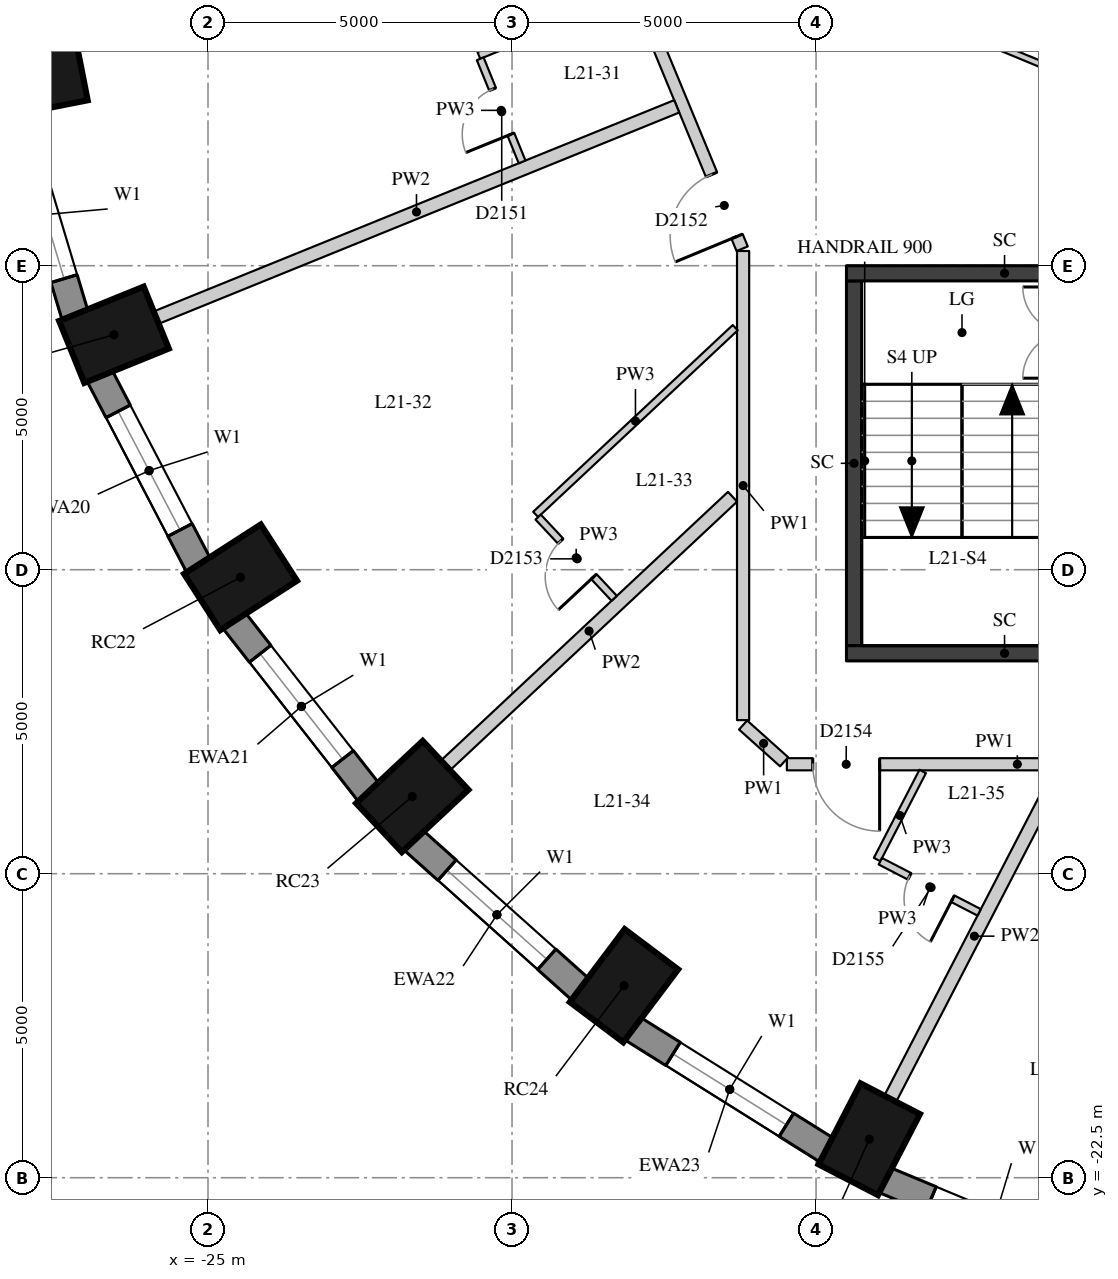
"""IFC4 building model, lengths in metres.
Left out: names, types, materials, properties, quantities, classifications, styles, units other than length and angle.
Written with IfcOpenShell. Run it as: python <this file> out.ifc"""

import sys

from ifc_helpers import new_model, si_unit, direction, frame, frame_2d, origin, origin_2d, place, context, subcontext, project, spatial, rectangle, extrude, element, fill, save


model = new_model("IFC4")
c1 = context("Model", 3, precision=1e-05, world=origin(), true_north=direction((0.0, 1.0)))
c2 = subcontext(c1, "Body", "Model", "MODEL_VIEW")
j1 = project(units=[si_unit("LENGTHUNIT", "METRE"), si_unit("PLANEANGLEUNIT", "RADIAN")], contexts=[c1])
p1 = place(None, origin())
s1 = spatial("IfcSite", under=j1, at=p1, CompositionType="ELEMENT")
p2 = place(p1, origin())
s2 = spatial("IfcBuilding", under=s1, at=p2, CompositionType="ELEMENT")
p3 = place(p2, frame((0.0, 0.0, 77.8)))
s3 = spatial("IfcBuildingStorey", under=s2, at=p3, CompositionType="ELEMENT", Elevation=77.8)
for number, where, z_axis, x_axis in (
    (1, (-27.821, -4.385, 0.0), (0.0, 0.0, 1.0), (-0.981, -0.193, 0.0)),
    (2, (-26.546, -8.636, 0.0), (0.0, 0.0, 1.0), (-0.927, -0.376, 0.0)),
    (3, (-24.465, -12.625, 0.0), (0.0, 0.0, 1.0), (-0.841, -0.541, 0.0)),
    (4, (-21.641, -16.23, 0.0), (0.0, 0.0, 1.0), (-0.73, -0.683, 0.0)),
    (5, (-18.159, -19.343, 0.0), (0.0, 0.0, 1.0), (-0.601, -0.799, 0.0)),
    (6, (-14.125, -21.867, 0.0), (0.0, 0.0, 1.0), (-0.46, -0.888, 0.0)),
):
    element("IfcColumn", number, at=place(p3, frame(where, z_axis=z_axis, x_axis=x_axis)), inside=s3, PredefinedType="COLUMN", context=c2, shape_type="SweptSolid", body=[
        extrude(rectangle(XDim=1.5, YDim=1.1, at=origin_2d()), origin(), (0.0, 0.0, 1.0), 3.3),
    ])
p4 = place(p3, frame((-28.182, -4.996, 0.0), z_axis=(0.0, 0.0, 1.0), x_axis=(0.287064133733, -0.957911364963, 0.0)))
e7 = element("IfcWall", 7, at=p4, inside=s3, PredefinedType="SOLIDWALL", context=c2, shape_type="SweptSolid", body=[
    extrude(rectangle(XDim=3.473, YDim=0.45, at=frame_2d((1.737, 0.0))), origin(), (0.0, 0.0, 1.0), 3.02),
])
p5 = place(p4, frame((0.637, 0.0, 0.4)))
e8 = element("IfcOpeningElement", 8, at=p5, cuts=e7, PredefinedType="OPENING", context=c2, shape_type="SweptSolid", body=[
    extrude(rectangle(XDim=2.2, YDim=1.75, at=frame_2d((1.1, 0.875))), frame((0.0, 0.235, 0.0), z_axis=(0.0, -1.0, 0.0), x_axis=(1.0, 0.0, 0.0)), (0.0, 0.0, 1.0), 0.47),
])
p6 = place(p3, frame((-26.786, -9.305, 0.0), z_axis=(0.0, 0.0, 1.0), x_axis=(0.462492775226, -0.886623050041, 0.0)))
e9 = element("IfcWall", 9, at=p6, inside=s3, PredefinedType="SOLIDWALL", context=c2, shape_type="SweptSolid", body=[
    extrude(rectangle(XDim=3.532, YDim=0.45, at=frame_2d((1.766, 0.0))), origin(), (0.0, 0.0, 1.0), 3.02),
])
p7 = place(p6, frame((0.666, 0.0, 0.4)))
e10 = element("IfcOpeningElement", 10, at=p7, cuts=e9, PredefinedType="OPENING", context=c2, shape_type="SweptSolid", body=[
    extrude(rectangle(XDim=2.2, YDim=1.75, at=frame_2d((1.1, 0.875))), frame((0.0, 0.235, 0.0), z_axis=(0.0, -1.0, 0.0), x_axis=(1.0, 0.0, 0.0)), (0.0, 0.0, 1.0), 0.47),
])
p8 = place(p3, frame((-24.578, -13.328, 0.0), z_axis=(0.0, 0.0, 1.0), x_axis=(0.616661975264, -0.787228053529, 0.0)))
e11 = element("IfcWall", 11, at=p8, inside=s3, PredefinedType="SOLIDWALL", context=c2, shape_type="SweptSolid", body=[
    extrude(rectangle(XDim=3.61, YDim=0.45, at=frame_2d((1.805, 0.0))), origin(), (0.0, 0.0, 1.0), 3.02),
])
p9 = place(p8, frame((0.705, 0.0, 0.4)))
e12 = element("IfcOpeningElement", 12, at=p9, cuts=e11, PredefinedType="OPENING", context=c2, shape_type="SweptSolid", body=[
    extrude(rectangle(XDim=2.2, YDim=1.75, at=frame_2d((1.1, 0.875))), frame((0.0, 0.235, 0.0), z_axis=(0.0, -1.0, 0.0), x_axis=(1.0, 0.0, 0.0)), (0.0, 0.0, 1.0), 0.47),
])
p10 = place(p3, frame((-21.627, -16.943, 0.0), z_axis=(0.0, 0.0, 1.0), x_axis=(0.745526233716, -0.66647628228, 0.0)))
e13 = element("IfcWall", 13, at=p10, inside=s3, PredefinedType="SOLIDWALL", context=c2, shape_type="SweptSolid", body=[
    extrude(rectangle(XDim=3.697, YDim=0.45, at=frame_2d((1.848, 0.0))), origin(), (0.0, 0.0, 1.0), 3.02),
])
p11 = place(p10, frame((0.749, 0.0, 0.4)))
e14 = element("IfcOpeningElement", 14, at=p11, cuts=e13, PredefinedType="OPENING", context=c2, shape_type="SweptSolid", body=[
    extrude(rectangle(XDim=2.2, YDim=1.75, at=frame_2d((1.1, 0.875))), frame((0.0, 0.235, 0.0), z_axis=(0.0, -1.0, 0.0), x_axis=(1.0, 0.0, 0.0)), (0.0, 0.0, 1.0), 0.47),
])
p12 = place(p3, frame((-18.023, -20.044, 0.0), z_axis=(0.0, 0.0, 1.0), x_axis=(0.847635480093, -0.530579016629, 0.0)))
e15 = element("IfcWall", 15, at=p12, inside=s3, PredefinedType="SOLIDWALL", context=c2, shape_type="SweptSolid", body=[
    extrude(rectangle(XDim=3.782, YDim=0.45, at=frame_2d((1.891, 0.0))), origin(), (0.0, 0.0, 1.0), 3.02),
])
p13 = place(p12, frame((0.791, 0.0, 0.4)))
e16 = element("IfcOpeningElement", 16, at=p13, cuts=e15, PredefinedType="OPENING", context=c2, shape_type="SweptSolid", body=[
    extrude(rectangle(XDim=2.2, YDim=1.75, at=frame_2d((1.1, 0.875))), frame((0.0, 0.235, 0.0), z_axis=(0.0, -1.0, 0.0), x_axis=(1.0, 0.0, 0.0)), (0.0, 0.0, 1.0), 0.47),
])
p14 = place(p3, frame((-13.875, -22.537, 0.0), z_axis=(0.0, 0.0, 1.0), x_axis=(0.923031964282, -0.384723267966, 0.0)))
e17 = element("IfcWall", 17, at=p14, inside=s3, PredefinedType="SOLIDWALL", context=c2, shape_type="SweptSolid", body=[
    extrude(rectangle(XDim=3.856, YDim=0.45, at=frame_2d((1.928, 0.0))), origin(), (0.0, 0.0, 1.0), 3.02),
])
p15 = place(p14, frame((0.828, 0.0, 0.4)))
e18 = element("IfcOpeningElement", 18, at=p15, cuts=e17, PredefinedType="OPENING", context=c2, shape_type="SweptSolid", body=[
    extrude(rectangle(XDim=2.2, YDim=1.75, at=frame_2d((1.1, 0.875))), frame((0.0, 0.235, 0.0), z_axis=(0.0, -1.0, 0.0), x_axis=(1.0, 0.0, 0.0)), (0.0, 0.0, 1.0), 0.47),
])
p16 = place(p3, frame((-14.375, -13.75, -0.28), z_axis=(0.0, 0.0, 1.0), x_axis=(0.0, 1.0, 0.0)))
e19 = element("IfcWall", 19, at=p16, inside=s3, PredefinedType="SHEAR", context=c2, shape_type="SweptSolid", body=[
    extrude(rectangle(XDim=6.0, YDim=0.25, at=frame_2d((3.0, 0.0))), origin(), (0.0, 0.0, 1.0), 3.3),
])
for number, where, z_axis, x_axis in (
    (20, (-14.5, -7.625, -0.28), (0.0, 0.0, 1.0), (1.0, 0.0, 0.0)),
    (21, (-14.5, -13.875, -0.28), (0.0, 0.0, 1.0), (1.0, 0.0, 0.0)),
):
    element("IfcWall", number, at=place(p3, frame(where, z_axis=z_axis, x_axis=x_axis)), inside=s3, PredefinedType="SHEAR", context=c2, shape_type="SweptSolid", body=[
        extrude(rectangle(XDim=5.2, YDim=0.25, at=frame_2d((2.6, 0.0))), origin(), (0.0, 0.0, 1.0), 3.3),
    ])
p17 = place(p3, frame((-7.9, -15.7, 0.0), z_axis=(0.0, 0.0, 1.0), x_axis=(-1.0, 0.0, 0.0)))
e22 = element("IfcWall", 22, at=p17, inside=s3, PredefinedType="PARTITIONING", context=c2, shape_type="SweptSolid", body=[
    extrude(rectangle(XDim=7.58, YDim=0.2, at=frame_2d((3.79, 0.0))), origin(), (0.0, 0.0, 1.0), 3.02),
])
p18 = place(p17, frame((6.054, 0.0, 0.0)))
e23 = element("IfcOpeningElement", 23, at=p18, cuts=e22, PredefinedType="OPENING", context=c2, shape_type="SweptSolid", body=[
    extrude(rectangle(XDim=1.1, YDim=2.1, at=frame_2d((0.55, 1.05))), frame((0.0, 0.11, 0.0), z_axis=(0.0, -1.0, 0.0), x_axis=(1.0, 0.0, 0.0)), (0.0, 0.0, 1.0), 0.22),
])
p19 = place(p17, frame((1.377, 0.0, 0.0)))
e24 = element("IfcOpeningElement", 24, at=p19, cuts=e22, PredefinedType="OPENING", context=c2, shape_type="SweptSolid", body=[
    extrude(rectangle(XDim=1.0, YDim=2.1, at=frame_2d((0.5, 1.05))), frame((0.0, 0.11, 0.0), z_axis=(0.0, -1.0, 0.0), x_axis=(1.0, 0.0, 0.0)), (0.0, 0.0, 1.0), 0.22),
])
p20 = place(p3, frame((-15.525, -15.66, 0.0), z_axis=(0.0, 0.0, 1.0), x_axis=(-0.744684787626, 0.667416337138, 0.0)))
e25 = element("IfcWall", 25, at=p20, inside=s3, PredefinedType="PARTITIONING", context=c2, shape_type="SweptSolid", body=[
    extrude(rectangle(XDim=0.907, YDim=0.2, at=frame_2d((0.453, 0.0))), origin(), (0.0, 0.0, 1.0), 3.02),
])
p21 = place(p3, frame((-16.2, -14.974, 0.0), z_axis=(0.0, 0.0, 1.0), x_axis=(0.0, 1.0, 0.0)))
e26 = element("IfcWall", 26, at=p21, inside=s3, PredefinedType="PARTITIONING", context=c2, shape_type="SweptSolid", body=[
    extrude(rectangle(XDim=7.716, YDim=0.2, at=frame_2d((3.858, 0.0))), origin(), (0.0, 0.0, 1.0), 3.02),
])
p22 = place(p3, frame((-16.215, -7.221, 0.0), z_axis=(0.0, 0.0, 1.0), x_axis=(-0.382000362846, 0.924162173423, 0.0)))
e27 = element("IfcWall", 27, at=p22, inside=s3, PredefinedType="PARTITIONING", context=c2, shape_type="SweptSolid", body=[
    extrude(rectangle(XDim=7.814, YDim=0.2, at=frame_2d((3.907, 0.0))), origin(), (0.0, 0.0, 1.0), 3.02),
])
p23 = place(p22, frame((0.22, 0.0, 0.0)))
e28 = element("IfcOpeningElement", 28, at=p23, cuts=e27, PredefinedType="OPENING", context=c2, shape_type="SweptSolid", body=[
    extrude(rectangle(XDim=1.1, YDim=2.1, at=frame_2d((0.55, 1.05))), frame((0.0, 0.11, 0.0), z_axis=(0.0, -1.0, 0.0), x_axis=(1.0, 0.0, 0.0)), (0.0, 0.0, 1.0), 0.22),
])
p24 = place(p3, frame((-25.851, -8.354, 0.0), z_axis=(0.0, 0.0, 1.0), x_axis=(0.926554383207, 0.376160836558, 0.0)))
e29 = element("IfcWall", 29, at=p24, inside=s3, PredefinedType="PARTITIONING", context=c2, shape_type="SweptSolid", body=[
    extrude(rectangle(XDim=9.238, YDim=0.22, at=frame_2d((4.619, 0.0))), origin(), (0.0, 0.0, 1.0), 3.02),
])
p25 = place(p3, frame((-21.093, -15.718, 0.0), z_axis=(0.0, 0.0, 1.0), x_axis=(0.730096357883, 0.68334420917, 0.0)))
e30 = element("IfcWall", 30, at=p25, inside=s3, PredefinedType="PARTITIONING", context=c2, shape_type="SweptSolid", body=[
    extrude(rectangle(XDim=6.465, YDim=0.22, at=frame_2d((3.232, 0.0))), origin(), (0.0, 0.0, 1.0), 3.02),
])
p26 = place(p3, frame((-13.78, -21.201, 0.0), z_axis=(0.0, 0.0, 1.0), x_axis=(0.459689820266, 0.888079539875, 0.0)))
e31 = element("IfcWall", 31, at=p26, inside=s3, PredefinedType="PARTITIONING", context=c2, shape_type="SweptSolid", body=[
    extrude(rectangle(XDim=6.021, YDim=0.22, at=frame_2d((3.011, 0.0))), origin(), (0.0, 0.0, 1.0), 3.02),
])
p27 = place(p3, frame((-18.056, -3.031, 0.0), z_axis=(0.0, 0.0, 1.0), x_axis=(-0.926540804766, -0.376194281061, 0.0)))
e32 = element("IfcWall", 32, at=p27, inside=s3, PredefinedType="PARTITIONING", context=c2, shape_type="SweptSolid", body=[
    extrude(rectangle(XDim=2.688, YDim=0.12, at=frame_2d((1.344, 0.0))), origin(), (0.0, 0.0, 1.0), 2.47),
])
p28 = place(p3, frame((-16.329, -8.52, 0.0), z_axis=(0.0, 0.0, 1.0), x_axis=(-0.730102689118, -0.68333744471, 0.0)))
e33 = element("IfcWall", 33, at=p28, inside=s3, PredefinedType="PARTITIONING", context=c2, shape_type="SweptSolid", body=[
    extrude(rectangle(XDim=4.495, YDim=0.12, at=frame_2d((2.248, 0.0))), origin(), (0.0, 0.0, 1.0), 3.02),
])
p29 = place(p3, frame((-13.246, -15.818, 0.0), z_axis=(0.0, 0.0, 1.0), x_axis=(-0.459675202516, -0.888087106196, 0.0)))
e34 = element("IfcWall", 34, at=p29, inside=s3, PredefinedType="PARTITIONING", context=c2, shape_type="SweptSolid", body=[
    extrude(rectangle(XDim=1.632, YDim=0.12, at=frame_2d((0.816, 0.0))), origin(), (0.0, 0.0, 1.0), 3.02),
])
p30 = place(p3, frame((-20.523, -4.097, 0.0), z_axis=(0.0, 0.0, 1.0), x_axis=(0.376216010002, -0.92653198208, 0.0)))
e35 = element("IfcWall", 35, at=p30, inside=s3, PredefinedType="PARTITIONING", context=c2, shape_type="SweptSolid", body=[
    extrude(rectangle(XDim=1.83, YDim=0.12, at=frame_2d((0.915, 0.0))), origin(), (0.0, 0.0, 1.0), 3.02),
])
p31 = place(p30, frame((0.54, 0.0, 0.0)))
e36 = element("IfcOpeningElement", 36, at=p31, cuts=e35, PredefinedType="OPENING", context=c2, shape_type="SweptSolid", body=[
    extrude(rectangle(XDim=0.8, YDim=2.1, at=frame_2d((0.4, 1.05))), frame((0.0, 0.07, 0.0), z_axis=(0.0, -1.0, 0.0), x_axis=(1.0, 0.0, 0.0)), (0.0, 0.0, 1.0), 0.14),
])
p32 = place(p3, frame((-19.57, -11.635, 0.0), z_axis=(0.0, 0.0, 1.0), x_axis=(0.683306289544, -0.730131847456, 0.0)))
e37 = element("IfcWall", 37, at=p32, inside=s3, PredefinedType="PARTITIONING", context=c2, shape_type="SweptSolid", body=[
    extrude(rectangle(XDim=1.83, YDim=0.12, at=frame_2d((0.915, 0.0))), origin(), (0.0, 0.0, 1.0), 3.02),
])
p33 = place(p32, frame((0.54, 0.0, 0.0)))
e38 = element("IfcOpeningElement", 38, at=p33, cuts=e37, PredefinedType="OPENING", context=c2, shape_type="SweptSolid", body=[
    extrude(rectangle(XDim=0.8, YDim=2.1, at=frame_2d((0.4, 1.05))), frame((0.0, 0.07, 0.0), z_axis=(0.0, -1.0, 0.0), x_axis=(1.0, 0.0, 0.0)), (0.0, 0.0, 1.0), 0.14),
])
p34 = place(p3, frame((-13.943, -17.295, 0.0), z_axis=(0.0, 0.0, 1.0), x_axis=(0.888151937069, -0.459549928387, 0.0)))
e39 = element("IfcWall", 39, at=p34, inside=s3, PredefinedType="PARTITIONING", context=c2, shape_type="SweptSolid", body=[
    extrude(rectangle(XDim=1.83, YDim=0.12, at=frame_2d((0.915, 0.0))), origin(), (0.0, 0.0, 1.0), 3.02),
])
p35 = place(p34, frame((0.54, 0.0, 0.0)))
e40 = element("IfcOpeningElement", 40, at=p35, cuts=e39, PredefinedType="OPENING", context=c2, shape_type="SweptSolid", body=[
    extrude(rectangle(XDim=0.8, YDim=2.1, at=frame_2d((0.4, 1.05))), frame((0.0, 0.07, 0.0), z_axis=(0.0, -1.0, 0.0), x_axis=(1.0, 0.0, 0.0)), (0.0, 0.0, 1.0), 0.14),
])
p36 = place(p3, frame((-8.0, -5.554, 0.0), z_axis=(0.0, 0.0, 1.0), x_axis=(-0.923860025149, 0.382730523909, 0.0)))
e41 = element("IfcWall", 41, at=p36, inside=s3, PredefinedType="PARTITIONING", context=c2, shape_type="SweptSolid", body=[
    extrude(rectangle(XDim=4.251, YDim=0.1, at=frame_2d((2.125, 0.0))), origin(), (0.0, 0.0, 1.0), 3.02),
])
p37 = place(p5, origin())
e42 = element("IfcWindow", 42, at=p37, inside=s3, PartitioningType="SINGLE_PANEL", PredefinedType="WINDOW", context=c2, shape_type="SweptSolid", body=[
    extrude(rectangle(XDim=2.2, YDim=1.75, at=frame_2d((1.1, 0.875))), frame((0.0, 0.035, 0.0), z_axis=(0.0, -1.0, 0.0), x_axis=(1.0, 0.0, 0.0)), (0.0, 0.0, 1.0), 0.06),
])
fill(e8, e42)
p38 = place(p7, origin())
e43 = element("IfcWindow", 43, at=p38, inside=s3, PartitioningType="SINGLE_PANEL", PredefinedType="WINDOW", context=c2, shape_type="SweptSolid", body=[
    extrude(rectangle(XDim=2.2, YDim=1.75, at=frame_2d((1.1, 0.875))), frame((0.0, 0.035, 0.0), z_axis=(0.0, -1.0, 0.0), x_axis=(1.0, 0.0, 0.0)), (0.0, 0.0, 1.0), 0.06),
])
fill(e10, e43)
p39 = place(p9, origin())
e44 = element("IfcWindow", 44, at=p39, inside=s3, PartitioningType="SINGLE_PANEL", PredefinedType="WINDOW", context=c2, shape_type="SweptSolid", body=[
    extrude(rectangle(XDim=2.2, YDim=1.75, at=frame_2d((1.1, 0.875))), frame((0.0, 0.035, 0.0), z_axis=(0.0, -1.0, 0.0), x_axis=(1.0, 0.0, 0.0)), (0.0, 0.0, 1.0), 0.06),
])
fill(e12, e44)
p40 = place(p11, origin())
e45 = element("IfcWindow", 45, at=p40, inside=s3, PartitioningType="SINGLE_PANEL", PredefinedType="WINDOW", context=c2, shape_type="SweptSolid", body=[
    extrude(rectangle(XDim=2.2, YDim=1.75, at=frame_2d((1.1, 0.875))), frame((0.0, 0.035, 0.0), z_axis=(0.0, -1.0, 0.0), x_axis=(1.0, 0.0, 0.0)), (0.0, 0.0, 1.0), 0.06),
])
fill(e14, e45)
p41 = place(p13, origin())
e46 = element("IfcWindow", 46, at=p41, inside=s3, PartitioningType="SINGLE_PANEL", PredefinedType="WINDOW", context=c2, shape_type="SweptSolid", body=[
    extrude(rectangle(XDim=2.2, YDim=1.75, at=frame_2d((1.1, 0.875))), frame((0.0, 0.035, 0.0), z_axis=(0.0, -1.0, 0.0), x_axis=(1.0, 0.0, 0.0)), (0.0, 0.0, 1.0), 0.06),
])
fill(e16, e46)
p42 = place(p15, origin())
e47 = element("IfcWindow", 47, at=p42, inside=s3, PartitioningType="SINGLE_PANEL", PredefinedType="WINDOW", context=c2, shape_type="SweptSolid", body=[
    extrude(rectangle(XDim=2.2, YDim=1.75, at=frame_2d((1.1, 0.875))), frame((0.0, 0.035, 0.0), z_axis=(0.0, -1.0, 0.0), x_axis=(1.0, 0.0, 0.0)), (0.0, 0.0, 1.0), 0.06),
])
fill(e18, e47)
p43 = place(p31, origin())
e48 = element("IfcDoor", 48, at=p43, inside=s3, OperationType="SINGLE_SWING_LEFT", PredefinedType="DOOR", context=c2, shape_type="SweptSolid", body=[
    extrude(rectangle(XDim=0.8, YDim=2.1, at=frame_2d((0.4, 1.05))), frame((0.0, 0.025, 0.0), z_axis=(0.0, -1.0, 0.0), x_axis=(1.0, 0.0, 0.0)), (0.0, 0.0, 1.0), 0.05),
])
fill(e36, e48)
p44 = place(p23, origin())
e49 = element("IfcDoor", 49, at=p44, inside=s3, OperationType="SINGLE_SWING_LEFT", PredefinedType="DOOR", context=c2, shape_type="SweptSolid", body=[
    extrude(rectangle(XDim=1.1, YDim=2.1, at=frame_2d((0.55, 1.05))), frame((0.0, 0.025, 0.0), z_axis=(0.0, -1.0, 0.0), x_axis=(1.0, 0.0, 0.0)), (0.0, 0.0, 1.0), 0.05),
])
fill(e28, e49)
p45 = place(p33, origin())
e50 = element("IfcDoor", 50, at=p45, inside=s3, OperationType="SINGLE_SWING_LEFT", PredefinedType="DOOR", context=c2, shape_type="SweptSolid", body=[
    extrude(rectangle(XDim=0.8, YDim=2.1, at=frame_2d((0.4, 1.05))), frame((0.0, 0.025, 0.0), z_axis=(0.0, -1.0, 0.0), x_axis=(1.0, 0.0, 0.0)), (0.0, 0.0, 1.0), 0.05),
])
fill(e38, e50)
p46 = place(p18, origin())
e51 = element("IfcDoor", 51, at=p46, inside=s3, OperationType="SINGLE_SWING_LEFT", PredefinedType="DOOR", context=c2, shape_type="SweptSolid", body=[
    extrude(rectangle(XDim=1.1, YDim=2.1, at=frame_2d((0.55, 1.05))), frame((0.0, 0.025, 0.0), z_axis=(0.0, -1.0, 0.0), x_axis=(1.0, 0.0, 0.0)), (0.0, 0.0, 1.0), 0.05),
])
fill(e23, e51)
p47 = place(p35, origin())
e52 = element("IfcDoor", 52, at=p47, inside=s3, OperationType="SINGLE_SWING_LEFT", PredefinedType="DOOR", context=c2, shape_type="SweptSolid", body=[
    extrude(rectangle(XDim=0.8, YDim=2.1, at=frame_2d((0.4, 1.05))), frame((0.0, 0.025, 0.0), z_axis=(0.0, -1.0, 0.0), x_axis=(1.0, 0.0, 0.0)), (0.0, 0.0, 1.0), 0.05),
])
fill(e40, e52)
save(model, sys.argv[1])
